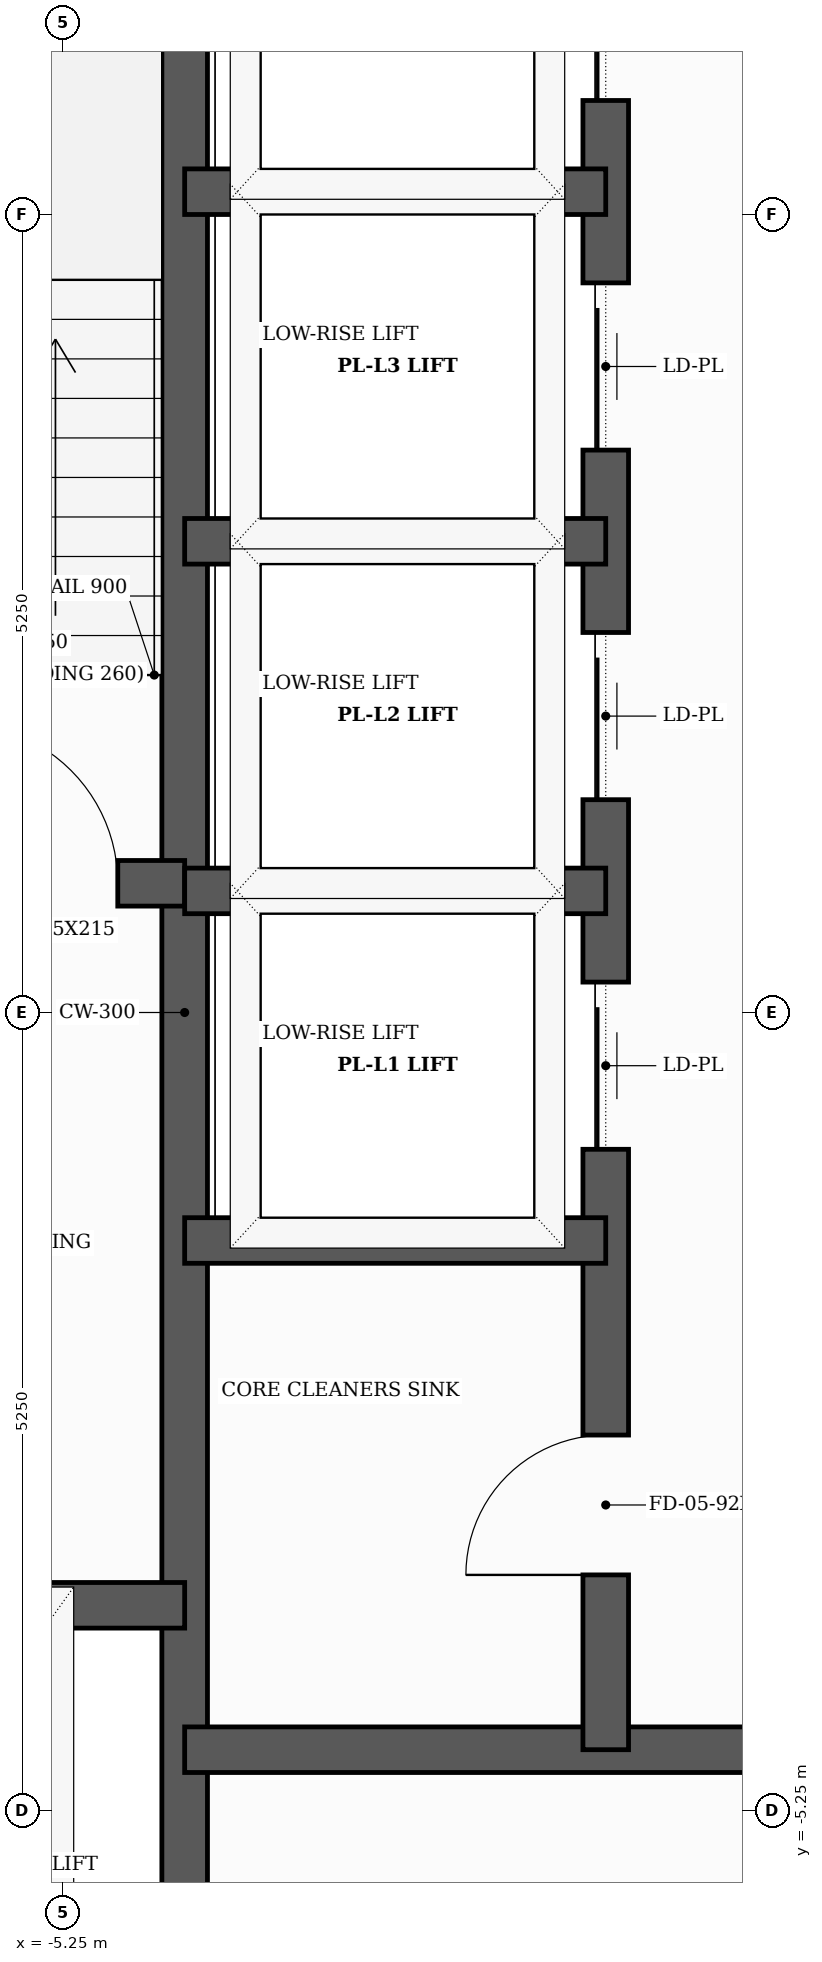
"""IFC4 building model, lengths in metres.
Left out: names, types, materials, properties, quantities, classifications, styles, units other than length and angle.
Written with IfcOpenShell. Run it as: python <this file> out.ifc"""

import sys

from ifc_helpers import new_model, si_unit, direction, frame, frame_2d, origin, place, context, subcontext, project, spatial, rectangle, extrude, element, fill, save


model = new_model("IFC4")
c1 = context("Model", 3, precision=1e-05, world=origin(), true_north=direction((0.0, 1.0)))
c2 = subcontext(c1, "Body", "Model", "MODEL_VIEW")
j1 = project(units=[si_unit("LENGTHUNIT", "METRE"), si_unit("PLANEANGLEUNIT", "RADIAN")], contexts=[c1])
p1 = place(None, origin())
s1 = spatial("IfcSite", under=j1, at=p1, CompositionType="ELEMENT")
p2 = place(p1, origin())
s2 = spatial("IfcBuilding", under=s1, at=p2, CompositionType="ELEMENT")
p3 = place(p2, frame((0.0, 0.0, 90.3)))
s3 = spatial("IfcBuildingStorey", under=s2, at=p3, CompositionType="ELEMENT", Elevation=90.3)
p4 = place(p3, frame((-4.45, -7.79, 0.0), z_axis=(0.0, 0.0, 1.0), x_axis=(0.0, 1.0, 0.0)))
e1 = element("IfcWall", 1, at=p4, inside=s3, PredefinedType="SHEAR", context=c2, shape_type="SweptSolid", body=[
    extrude(rectangle(XDim=15.58, YDim=0.3, at=frame_2d((7.79, 0.0))), origin(), (0.0, 0.0, 1.0), 3.5),
])
p5 = place(p3, frame((-7.79, 0.85, 0.0), z_axis=(0.0, 0.0, 1.0), x_axis=(1.0, 0.0, 0.0)))
e2 = element("IfcWall", 2, at=p5, inside=s3, PredefinedType="SHEAR", context=c2, shape_type="SweptSolid", body=[
    extrude(rectangle(XDim=3.34, YDim=0.3, at=frame_2d((1.67, 0.0))), origin(), (0.0, 0.0, 1.0), 3.5),
])
p6 = place(p5, frame((1.85, 0.0, 0.0)))
e3 = element("IfcOpeningElement", 3, at=p6, cuts=e2, PredefinedType="OPENING", context=c2, shape_type="SweptSolid", body=[
    extrude(rectangle(XDim=1.05, YDim=2.15, at=frame_2d((0.525, 1.075))), frame((0.0, 0.16, 0.0), z_axis=(0.0, -1.0, 0.0), x_axis=(1.0, 0.0, 0.0)), (0.0, 0.0, 1.0), 0.32),
])
p7 = place(p3, frame((-7.79, -3.9, 0.0), z_axis=(0.0, 0.0, 1.0), x_axis=(1.0, 0.0, 0.0)))
e4 = element("IfcWall", 4, at=p7, inside=s3, PredefinedType="SHEAR", context=c2, shape_type="SweptSolid", body=[
    extrude(rectangle(XDim=3.34, YDim=0.3, at=frame_2d((1.67, 0.0))), origin(), (0.0, 0.0, 1.0), 3.5),
])
p8 = place(p7, frame((1.27, 0.0, 0.0)))
e5 = element("IfcOpeningElement", 5, at=p8, cuts=e4, PredefinedType="OPENING", context=c2, shape_type="SweptSolid", body=[
    extrude(rectangle(XDim=1.1, YDim=2.1, at=frame_2d((0.55, 1.05))), frame((0.0, 0.16, 0.0), z_axis=(0.0, -1.0, 0.0), x_axis=(1.0, 0.0, 0.0)), (0.0, 0.0, 1.0), 0.32),
])
p9 = place(p3, frame((-4.45, -4.85, 0.0), z_axis=(0.0, 0.0, 1.0), x_axis=(1.0, 0.0, 0.0)))
e6 = element("IfcWall", 6, at=p9, inside=s3, PredefinedType="SHEAR", context=c2, shape_type="SweptSolid", body=[
    extrude(rectangle(XDim=8.9, YDim=0.3, at=frame_2d((4.45, 0.0))), origin(), (0.0, 0.0, 1.0), 3.5),
])
p10 = place(p3, frame((-1.68, -4.85, 0.0), z_axis=(0.0, 0.0, 1.0), x_axis=(0.0, 1.0, 0.0)))
e7 = element("IfcWall", 7, at=p10, inside=s3, PredefinedType="SHEAR", context=c2, shape_type="SweptSolid", body=[
    extrude(rectangle(XDim=12.64, YDim=0.3, at=frame_2d((6.32, 0.0))), origin(), (0.0, 0.0, 1.0), 3.5),
])
p11 = place(p10, frame((3.95, 0.0, 0.0)))
e8 = element("IfcOpeningElement", 8, at=p11, cuts=e7, PredefinedType="OPENING", context=c2, shape_type="SweptSolid", body=[
    extrude(rectangle(XDim=1.1, YDim=2.1, at=frame_2d((0.55, 1.05))), frame((0.0, 0.16, 0.0), z_axis=(0.0, -1.0, 0.0), x_axis=(1.0, 0.0, 0.0)), (0.0, 0.0, 1.0), 0.32),
])
p12 = place(p10, frame((6.25, 0.0, 0.0)))
e9 = element("IfcOpeningElement", 9, at=p12, cuts=e7, PredefinedType="OPENING", context=c2, shape_type="SweptSolid", body=[
    extrude(rectangle(XDim=1.1, YDim=2.1, at=frame_2d((0.55, 1.05))), frame((0.0, 0.16, 0.0), z_axis=(0.0, -1.0, 0.0), x_axis=(1.0, 0.0, 0.0)), (0.0, 0.0, 1.0), 0.32),
])
p13 = place(p10, frame((8.55, 0.0, 0.0)))
e10 = element("IfcOpeningElement", 10, at=p13, cuts=e7, PredefinedType="OPENING", context=c2, shape_type="SweptSolid", body=[
    extrude(rectangle(XDim=1.1, YDim=2.1, at=frame_2d((0.55, 1.05))), frame((0.0, 0.16, 0.0), z_axis=(0.0, -1.0, 0.0), x_axis=(1.0, 0.0, 0.0)), (0.0, 0.0, 1.0), 0.32),
])
p14 = place(p10, frame((10.85, 0.0, 0.0)))
e11 = element("IfcOpeningElement", 11, at=p14, cuts=e7, PredefinedType="OPENING", context=c2, shape_type="SweptSolid", body=[
    extrude(rectangle(XDim=1.1, YDim=2.1, at=frame_2d((0.55, 1.05))), frame((0.0, 0.16, 0.0), z_axis=(0.0, -1.0, 0.0), x_axis=(1.0, 0.0, 0.0)), (0.0, 0.0, 1.0), 0.32),
])
p15 = place(p10, frame((1.15, 0.0, 0.0)))
e12 = element("IfcOpeningElement", 12, at=p15, cuts=e7, PredefinedType="OPENING", context=c2, shape_type="SweptSolid", body=[
    extrude(rectangle(XDim=0.92, YDim=2.1, at=frame_2d((0.46, 1.05))), frame((0.0, 0.16, 0.0), z_axis=(0.0, -1.0, 0.0), x_axis=(1.0, 0.0, 0.0)), (0.0, 0.0, 1.0), 0.32),
])
for number, where, z_axis, x_axis in (
    (13, (-4.45, -1.5, 0.0), (0.0, 0.0, 1.0), (1.0, 0.0, 0.0)),
    (14, (-4.45, 0.8, 0.0), (0.0, 0.0, 1.0), (1.0, 0.0, 0.0)),
    (15, (-4.45, 3.1, 0.0), (0.0, 0.0, 1.0), (1.0, 0.0, 0.0)),
    (16, (-4.45, 5.4, 0.0), (0.0, 0.0, 1.0), (1.0, 0.0, 0.0)),
):
    element("IfcWall", number, at=place(p3, frame(where, z_axis=z_axis, x_axis=x_axis)), inside=s3, PredefinedType="SHEAR", context=c2, shape_type="SweptSolid", body=[
        extrude(rectangle(XDim=2.77, YDim=0.3, at=frame_2d((1.385, 0.0))), origin(), (0.0, 0.0, 1.0), 3.5),
    ])
p16 = place(p6, origin())
e17 = element("IfcDoor", 17, at=p16, inside=s3, OperationType="SINGLE_SWING_LEFT", PredefinedType="DOOR", context=c2, shape_type="SweptSolid", body=[
    extrude(rectangle(XDim=1.05, YDim=2.15, at=frame_2d((0.525, 1.075))), frame((0.0, 0.025, 0.0), z_axis=(0.0, -1.0, 0.0), x_axis=(1.0, 0.0, 0.0)), (0.0, 0.0, 1.0), 0.05),
])
fill(e3, e17)
p17 = place(p11, origin())
e18 = element("IfcDoor", 18, at=p17, inside=s3, OperationType="SLIDING_TO_LEFT", PredefinedType="DOOR", context=c2, shape_type="SweptSolid", body=[
    extrude(rectangle(XDim=1.1, YDim=2.1, at=frame_2d((0.55, 1.05))), frame((0.0, 0.025, 0.0), z_axis=(0.0, -1.0, 0.0), x_axis=(1.0, 0.0, 0.0)), (0.0, 0.0, 1.0), 0.05),
])
fill(e8, e18)
p18 = place(p12, origin())
e19 = element("IfcDoor", 19, at=p18, inside=s3, OperationType="SLIDING_TO_LEFT", PredefinedType="DOOR", context=c2, shape_type="SweptSolid", body=[
    extrude(rectangle(XDim=1.1, YDim=2.1, at=frame_2d((0.55, 1.05))), frame((0.0, 0.025, 0.0), z_axis=(0.0, -1.0, 0.0), x_axis=(1.0, 0.0, 0.0)), (0.0, 0.0, 1.0), 0.05),
])
fill(e9, e19)
p19 = place(p13, origin())
e20 = element("IfcDoor", 20, at=p19, inside=s3, OperationType="SLIDING_TO_LEFT", PredefinedType="DOOR", context=c2, shape_type="SweptSolid", body=[
    extrude(rectangle(XDim=1.1, YDim=2.1, at=frame_2d((0.55, 1.05))), frame((0.0, 0.025, 0.0), z_axis=(0.0, -1.0, 0.0), x_axis=(1.0, 0.0, 0.0)), (0.0, 0.0, 1.0), 0.05),
])
fill(e10, e20)
p20 = place(p14, origin())
e21 = element("IfcDoor", 21, at=p20, inside=s3, OperationType="SLIDING_TO_LEFT", PredefinedType="DOOR", context=c2, shape_type="SweptSolid", body=[
    extrude(rectangle(XDim=1.1, YDim=2.1, at=frame_2d((0.55, 1.05))), frame((0.0, 0.025, 0.0), z_axis=(0.0, -1.0, 0.0), x_axis=(1.0, 0.0, 0.0)), (0.0, 0.0, 1.0), 0.05),
])
fill(e11, e21)
p21 = place(p15, origin())
e22 = element("IfcDoor", 22, at=p21, inside=s3, OperationType="SINGLE_SWING_LEFT", PredefinedType="DOOR", context=c2, shape_type="SweptSolid", body=[
    extrude(rectangle(XDim=0.92, YDim=2.1, at=frame_2d((0.46, 1.05))), frame((0.0, 0.025, 0.0), z_axis=(0.0, -1.0, 0.0), x_axis=(1.0, 0.0, 0.0)), (0.0, 0.0, 1.0), 0.05),
])
fill(e12, e22)
save(model, sys.argv[1])
